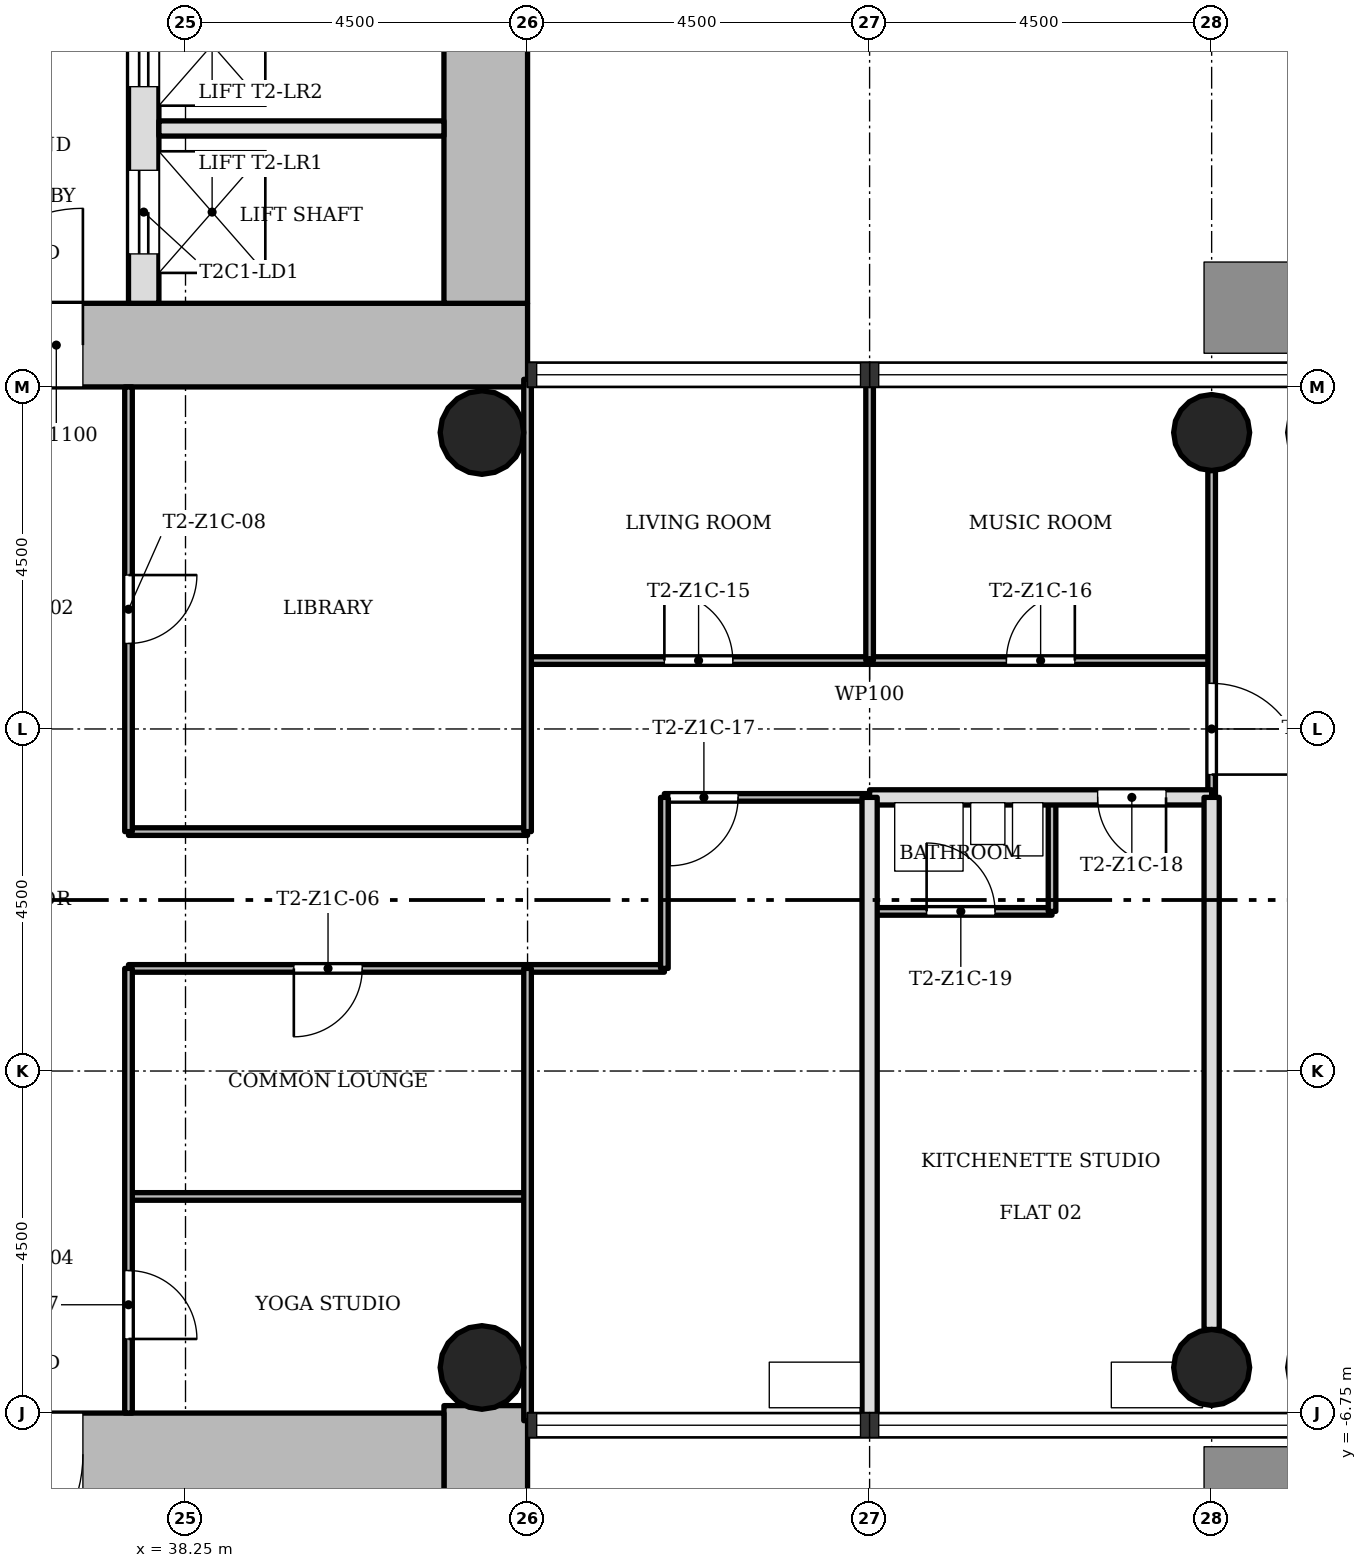
"""IFC4 building model, lengths in metres.
Left out: names, types, materials, properties, quantities, classifications, styles, units other than length and angle.
Written with IfcOpenShell. Run it as: python <this file> out.ifc"""

import sys

from ifc_helpers import new_model, si_unit, direction, frame, frame_2d, origin, origin_2d, place, context, subcontext, project, spatial, rectangle, hollow_circle, extrude, element, fill, save


model = new_model("IFC4")
c1 = context("Model", 3, precision=1e-05, world=origin(), true_north=direction((0.0, 1.0)))
c2 = subcontext(c1, "Body", "Model", "MODEL_VIEW")
j1 = project(units=[si_unit("LENGTHUNIT", "METRE"), si_unit("PLANEANGLEUNIT", "RADIAN")], contexts=[c1])
p1 = place(None, origin())
s1 = spatial("IfcSite", under=j1, at=p1, CompositionType="ELEMENT")
p2 = place(p1, origin())
s2 = spatial("IfcBuilding", under=s1, at=p2, CompositionType="ELEMENT")
p3 = place(p2, frame((0.0, 0.0, 44.9)))
s3 = spatial("IfcBuildingStorey", under=s2, at=p3, CompositionType="ELEMENT", Elevation=44.9)
p4 = place(p3, frame((30.35, 7.3, 0.0), z_axis=(0.0, 0.0, 1.0), x_axis=(1.0, 0.0, 0.0)))
e1 = element("IfcWall", 1, at=p4, inside=s3, PredefinedType="SHEAR", context=c2, shape_type="SweptSolid", body=[
    extrude(rectangle(XDim=12.4, YDim=1.1, at=frame_2d((6.2, 0.0))), origin(), (0.0, 0.0, 1.0), 3.4),
])
p5 = place(p4, frame((4.75, 0.0, 0.0)))
e2 = element("IfcOpeningElement", 2, at=p5, cuts=e1, PredefinedType="OPENING", context=c2, shape_type="SweptSolid", body=[
    extrude(rectangle(XDim=1.8, YDim=2.1, at=frame_2d((0.9, 1.05))), frame((0.0, 0.56, 0.0), z_axis=(0.0, -1.0, 0.0), x_axis=(1.0, 0.0, 0.0)), (0.0, 0.0, 1.0), 1.12),
])
p6 = place(p3, frame((42.2, 7.85, 0.0), z_axis=(0.0, 0.0, 1.0), x_axis=(0.0, 1.0, 0.0)))
e3 = element("IfcWall", 3, at=p6, inside=s3, PredefinedType="SHEAR", context=c2, shape_type="SweptSolid", body=[
    extrude(rectangle(XDim=7.9, YDim=1.1, at=frame_2d((3.95, 0.0))), origin(), (0.0, 0.0, 1.0), 3.4),
])
p7 = place(p3, frame((37.7, 7.85, 0.0), z_axis=(0.0, 0.0, 1.0), x_axis=(0.0, 1.0, 0.0)))
e4 = element("IfcWall", 4, at=p7, inside=s3, PredefinedType="SHEAR", context=c2, shape_type="SweptSolid", body=[
    extrude(rectangle(XDim=6.8, YDim=0.4, at=frame_2d((3.4, 0.0))), origin(), (0.0, 0.0, 1.0), 3.4),
])
p8 = place(p7, frame((0.65, 0.0, 0.0)))
e5 = element("IfcOpeningElement", 5, at=p8, cuts=e4, PredefinedType="OPENING", context=c2, shape_type="SweptSolid", body=[
    extrude(rectangle(XDim=1.1, YDim=2.1, at=frame_2d((0.55, 1.05))), frame((0.0, 0.21, 0.0), z_axis=(0.0, -1.0, 0.0), x_axis=(1.0, 0.0, 0.0)), (0.0, 0.0, 1.0), 0.42),
])
p9 = place(p7, frame((2.85, 0.0, 0.0)))
e6 = element("IfcOpeningElement", 6, at=p9, cuts=e4, PredefinedType="OPENING", context=c2, shape_type="SweptSolid", body=[
    extrude(rectangle(XDim=1.1, YDim=2.1, at=frame_2d((0.55, 1.05))), frame((0.0, 0.21, 0.0), z_axis=(0.0, -1.0, 0.0), x_axis=(1.0, 0.0, 0.0)), (0.0, 0.0, 1.0), 0.42),
])
p10 = place(p7, frame((5.05, 0.0, 0.0)))
e7 = element("IfcOpeningElement", 7, at=p10, cuts=e4, PredefinedType="OPENING", context=c2, shape_type="SweptSolid", body=[
    extrude(rectangle(XDim=1.1, YDim=2.1, at=frame_2d((0.55, 1.05))), frame((0.0, 0.21, 0.0), z_axis=(0.0, -1.0, 0.0), x_axis=(1.0, 0.0, 0.0)), (0.0, 0.0, 1.0), 0.42),
])
p11 = place(p3, frame((42.2, -15.248, 0.0), z_axis=(0.0, 0.0, 1.0), x_axis=(0.0, 1.0, 0.0)))
e8 = element("IfcWall", 8, at=p11, inside=s3, PredefinedType="SHEAR", context=c2, shape_type="SweptSolid", body=[
    extrude(rectangle(XDim=8.596, YDim=1.1, at=frame_2d((4.298, 0.0))), origin(), (0.0, 0.0, 1.0), 3.4),
])
p12 = place(p3, frame((41.65, -7.3, 0.0), z_axis=(0.0, 0.0, 1.0), x_axis=(-1.0, 0.0, 0.0)))
e9 = element("IfcWall", 9, at=p12, inside=s3, PredefinedType="SHEAR", context=c2, shape_type="SweptSolid", body=[
    extrude(rectangle(XDim=12.4, YDim=1.1, at=frame_2d((6.2, 0.0))), origin(), (0.0, 0.0, 1.0), 3.4),
])
p13 = place(p12, frame((4.75, 0.0, 0.0)))
e10 = element("IfcOpeningElement", 10, at=p13, cuts=e9, PredefinedType="OPENING", context=c2, shape_type="SweptSolid", body=[
    extrude(rectangle(XDim=1.8, YDim=2.1, at=frame_2d((0.9, 1.05))), frame((0.0, 0.56, 0.0), z_axis=(0.0, -1.0, 0.0), x_axis=(1.0, 0.0, 0.0)), (0.0, 0.0, 1.0), 1.12),
])
for number, where, z_axis, x_axis in (
    (11, (51.75, -6.15, 0.0), (0.0, 0.0, 1.0), (1.0, 0.0, 0.0)),
    (12, (51.75, 6.15, 0.0), (0.0, 0.0, 1.0), (1.0, 0.0, 0.0)),
):
    element("IfcColumn", number, at=place(p3, frame(where, z_axis=z_axis, x_axis=x_axis)), inside=s3, PredefinedType="COLUMN", context=c2, shape_type="SweptSolid", body=[
        extrude(hollow_circle(Radius=0.5, WallThickness=0.036, at=origin_2d()), origin(), (0.0, 0.0, 1.0), 3.4),
    ])
for number, where, z_axis, x_axis in (
    (13, (42.15, -6.15, 0.0), (0.0, 0.0, 1.0), (1.0, 0.0, 0.0)),
    (14, (42.15, 6.15, 0.0), (0.0, 0.0, 1.0), (1.0, 0.0, 0.0)),
):
    element("IfcColumn", number, at=place(p3, frame(where, z_axis=z_axis, x_axis=x_axis)), inside=s3, PredefinedType="COLUMN", context=c2, shape_type="SweptSolid", body=[
        extrude(hollow_circle(Radius=0.55, WallThickness=0.04, at=origin_2d()), origin(), (0.0, 0.0, 1.0), 3.4),
    ])
p14 = place(p3, frame((41.65, 10.15, 0.0), z_axis=(0.0, 0.0, 1.0), x_axis=(-1.0, 0.0, 0.0)))
e15 = element("IfcWall", 15, at=p14, inside=s3, PredefinedType="SOLIDWALL", context=c2, shape_type="SweptSolid", body=[
    extrude(rectangle(XDim=3.75, YDim=0.2, at=frame_2d((1.875, 0.0))), origin(), (0.0, 0.0, 1.0), 3.0),
])
p15 = place(p3, frame((42.75, -3.9, 0.0), z_axis=(0.0, 0.0, 1.0), x_axis=(-1.0, 0.0, 0.0)))
e16 = element("IfcWall", 16, at=p15, inside=s3, PredefinedType="PARTITIONING", context=c2, shape_type="SweptSolid", body=[
    extrude(rectangle(XDim=5.25, YDim=0.1, at=frame_2d((2.625, 0.0))), origin(), (0.0, 0.0, 1.0), 3.0),
])
p16 = place(p3, frame((44.55, -0.9, 0.0), z_axis=(0.0, 0.0, 1.0), x_axis=(-1.0, 0.0, 0.0)))
e17 = element("IfcWall", 17, at=p16, inside=s3, PredefinedType="PARTITIONING", context=c2, shape_type="SweptSolid", body=[
    extrude(rectangle(XDim=7.05, YDim=0.1, at=frame_2d((3.525, 0.0))), origin(), (0.0, 0.0, 1.0), 3.0),
])
p17 = place(p16, frame((3.975, 0.0, 0.0)))
e18 = element("IfcOpeningElement", 18, at=p17, cuts=e17, PredefinedType="OPENING", context=c2, shape_type="SweptSolid", body=[
    extrude(rectangle(XDim=0.9, YDim=2.1, at=frame_2d((0.45, 1.05))), frame((0.0, 0.06, 0.0), z_axis=(0.0, -1.0, 0.0), x_axis=(1.0, 0.0, 0.0)), (0.0, 0.0, 1.0), 0.12),
])
p18 = place(p3, frame((49.65, -0.15, 0.0), z_axis=(0.0, 0.0, 1.0), x_axis=(-1.0, 0.0, 0.0)))
e19 = element("IfcWall", 19, at=p18, inside=s3, PredefinedType="PARTITIONING", context=c2, shape_type="SweptSolid", body=[
    extrude(rectangle(XDim=2.4, YDim=0.1, at=frame_2d((1.2, 0.0))), origin(), (0.0, 0.0, 1.0), 3.0),
])
p19 = place(p18, frame((0.75, 0.0, 0.0)))
e20 = element("IfcOpeningElement", 20, at=p19, cuts=e19, PredefinedType="OPENING", context=c2, shape_type="SweptSolid", body=[
    extrude(rectangle(XDim=0.9, YDim=2.1, at=frame_2d((0.45, 1.05))), frame((0.0, 0.06, 0.0), z_axis=(0.0, -1.0, 0.0), x_axis=(1.0, 0.0, 0.0)), (0.0, 0.0, 1.0), 0.12),
])
p20 = place(p3, frame((42.75, 0.9, 0.0), z_axis=(0.0, 0.0, 1.0), x_axis=(-1.0, 0.0, 0.0)))
e21 = element("IfcWall", 21, at=p20, inside=s3, PredefinedType="PARTITIONING", context=c2, shape_type="SweptSolid", body=[
    extrude(rectangle(XDim=5.25, YDim=0.1, at=frame_2d((2.625, 0.0))), origin(), (0.0, 0.0, 1.0), 3.0),
])
p21 = place(p3, frame((47.25, 1.35, 0.0), z_axis=(0.0, 0.0, 1.0), x_axis=(-1.0, 0.0, 0.0)))
e22 = element("IfcWall", 22, at=p21, inside=s3, PredefinedType="PARTITIONING", context=c2, shape_type="SweptSolid", body=[
    extrude(rectangle(XDim=2.7, YDim=0.1, at=frame_2d((1.35, 0.0))), origin(), (0.0, 0.0, 1.0), 3.0),
])
p22 = place(p21, frame((1.73, 0.0, 0.0)))
e23 = element("IfcOpeningElement", 23, at=p22, cuts=e22, PredefinedType="OPENING", context=c2, shape_type="SweptSolid", body=[
    extrude(rectangle(XDim=0.9, YDim=2.1, at=frame_2d((0.45, 1.05))), frame((0.0, 0.06, 0.0), z_axis=(0.0, -1.0, 0.0), x_axis=(1.0, 0.0, 0.0)), (0.0, 0.0, 1.0), 0.12),
])
p23 = place(p3, frame((51.75, 1.35, 0.0), z_axis=(0.0, 0.0, 1.0), x_axis=(-1.0, 0.0, 0.0)))
e24 = element("IfcWall", 24, at=p23, inside=s3, PredefinedType="SOLIDWALL", context=c2, shape_type="SweptSolid", body=[
    extrude(rectangle(XDim=4.5, YDim=0.2, at=frame_2d((2.25, 0.0))), origin(), (0.0, 0.0, 1.0), 3.0),
])
p24 = place(p23, frame((0.6, 0.0, 0.0)))
e25 = element("IfcOpeningElement", 25, at=p24, cuts=e24, PredefinedType="OPENING", context=c2, shape_type="SweptSolid", body=[
    extrude(rectangle(XDim=0.9, YDim=2.1, at=frame_2d((0.45, 1.05))), frame((0.0, 0.11, 0.0), z_axis=(0.0, -1.0, 0.0), x_axis=(1.0, 0.0, 0.0)), (0.0, 0.0, 1.0), 0.22),
])
p25 = place(p3, frame((51.75, 3.15, 0.0), z_axis=(0.0, 0.0, 1.0), x_axis=(-1.0, 0.0, 0.0)))
e26 = element("IfcWall", 26, at=p25, inside=s3, PredefinedType="PARTITIONING", context=c2, shape_type="SweptSolid", body=[
    extrude(rectangle(XDim=9.0, YDim=0.1, at=frame_2d((4.5, 0.0))), origin(), (0.0, 0.0, 1.0), 3.0),
])
p26 = place(p25, frame((6.3, 0.0, 0.0)))
e27 = element("IfcOpeningElement", 27, at=p26, cuts=e26, PredefinedType="OPENING", context=c2, shape_type="SweptSolid", body=[
    extrude(rectangle(XDim=0.9, YDim=2.1, at=frame_2d((0.45, 1.05))), frame((0.0, 0.06, 0.0), z_axis=(0.0, -1.0, 0.0), x_axis=(1.0, 0.0, 0.0)), (0.0, 0.0, 1.0), 0.12),
])
p27 = place(p25, frame((1.8, 0.0, 0.0)))
e28 = element("IfcOpeningElement", 28, at=p27, cuts=e26, PredefinedType="OPENING", context=c2, shape_type="SweptSolid", body=[
    extrude(rectangle(XDim=0.9, YDim=2.1, at=frame_2d((0.45, 1.05))), frame((0.0, 0.06, 0.0), z_axis=(0.0, -1.0, 0.0), x_axis=(1.0, 0.0, 0.0)), (0.0, 0.0, 1.0), 0.12),
])
p28 = place(p3, frame((51.75, 1.35, 0.0), z_axis=(0.0, 0.0, 1.0), x_axis=(0.0, 1.0, 0.0)))
e29 = element("IfcWall", 29, at=p28, inside=s3, PredefinedType="PARTITIONING", context=c2, shape_type="SweptSolid", body=[
    extrude(rectangle(XDim=4.3, YDim=0.1, at=frame_2d((2.15, 0.0))), origin(), (0.0, 0.0, 1.0), 3.0),
])
p29 = place(p28, frame((0.3, 0.0, 0.0)))
e30 = element("IfcOpeningElement", 30, at=p29, cuts=e29, PredefinedType="OPENING", context=c2, shape_type="SweptSolid", body=[
    extrude(rectangle(XDim=1.2, YDim=2.1, at=frame_2d((0.6, 1.05))), frame((0.0, 0.06, 0.0), z_axis=(0.0, -1.0, 0.0), x_axis=(1.0, 0.0, 0.0)), (0.0, 0.0, 1.0), 0.12),
])
p30 = place(p3, frame((51.75, -5.65, 0.0), z_axis=(0.0, 0.0, 1.0), x_axis=(0.0, 1.0, 0.0)))
e31 = element("IfcWall", 31, at=p30, inside=s3, PredefinedType="SOLIDWALL", context=c2, shape_type="SweptSolid", body=[
    extrude(rectangle(XDim=7.0, YDim=0.2, at=frame_2d((3.5, 0.0))), origin(), (0.0, 0.0, 1.0), 3.0),
])
p31 = place(p3, frame((49.65, -0.15, 0.0), z_axis=(0.0, 0.0, 1.0), x_axis=(0.0, 1.0, 0.0)))
e32 = element("IfcWall", 32, at=p31, inside=s3, PredefinedType="PARTITIONING", context=c2, shape_type="SweptSolid", body=[
    extrude(rectangle(XDim=1.5, YDim=0.1, at=frame_2d((0.75, 0.0))), origin(), (0.0, 0.0, 1.0), 3.0),
])
p32 = place(p3, frame((47.25, 3.15, 0.0), z_axis=(0.0, 0.0, 1.0), x_axis=(0.0, 1.0, 0.0)))
e33 = element("IfcWall", 33, at=p32, inside=s3, PredefinedType="PARTITIONING", context=c2, shape_type="SweptSolid", body=[
    extrude(rectangle(XDim=3.7, YDim=0.1, at=frame_2d((1.85, 0.0))), origin(), (0.0, 0.0, 1.0), 3.0),
])
p33 = place(p3, frame((47.25, -6.85, 0.0), z_axis=(0.0, 0.0, 1.0), x_axis=(0.0, 1.0, 0.0)))
e34 = element("IfcWall", 34, at=p33, inside=s3, PredefinedType="SOLIDWALL", context=c2, shape_type="SweptSolid", body=[
    extrude(rectangle(XDim=8.2, YDim=0.2, at=frame_2d((4.1, 0.0))), origin(), (0.0, 0.0, 1.0), 3.0),
])
p34 = place(p3, frame((44.55, -0.9, 0.0), z_axis=(0.0, 0.0, 1.0), x_axis=(0.0, 1.0, 0.0)))
e35 = element("IfcWall", 35, at=p34, inside=s3, PredefinedType="PARTITIONING", context=c2, shape_type="SweptSolid", body=[
    extrude(rectangle(XDim=2.25, YDim=0.1, at=frame_2d((1.125, 0.0))), origin(), (0.0, 0.0, 1.0), 3.0),
])
for number, where, z_axis, x_axis in (
    (36, (42.75, -6.85, 0.0), (0.0, 0.0, 1.0), (0.0, 1.0, 0.0)),
    (37, (42.75, 0.9, 0.0), (0.0, 0.0, 1.0), (0.0, 1.0, 0.0)),
):
    element("IfcWall", number, at=place(p3, frame(where, z_axis=z_axis, x_axis=x_axis)), inside=s3, PredefinedType="PARTITIONING", context=c2, shape_type="SweptSolid", body=[
        extrude(rectangle(XDim=5.95, YDim=0.1, at=frame_2d((2.975, 0.0))), origin(), (0.0, 0.0, 1.0), 3.0),
    ])
p35 = place(p3, frame((37.5, -6.75, 0.0), z_axis=(0.0, 0.0, 1.0), x_axis=(0.0, 1.0, 0.0)))
e38 = element("IfcWall", 38, at=p35, inside=s3, PredefinedType="PARTITIONING", context=c2, shape_type="SweptSolid", body=[
    extrude(rectangle(XDim=5.85, YDim=0.1, at=frame_2d((2.925, 0.0))), origin(), (0.0, 0.0, 1.0), 3.0),
])
p36 = place(p35, frame((0.975, 0.0, 0.0)))
e39 = element("IfcOpeningElement", 39, at=p36, cuts=e38, PredefinedType="OPENING", context=c2, shape_type="SweptSolid", body=[
    extrude(rectangle(XDim=0.9, YDim=2.1, at=frame_2d((0.45, 1.05))), frame((0.0, 0.06, 0.0), z_axis=(0.0, -1.0, 0.0), x_axis=(1.0, 0.0, 0.0)), (0.0, 0.0, 1.0), 0.12),
])
p37 = place(p3, frame((37.5, 0.9, 0.0), z_axis=(0.0, 0.0, 1.0), x_axis=(0.0, 1.0, 0.0)))
e40 = element("IfcWall", 40, at=p37, inside=s3, PredefinedType="PARTITIONING", context=c2, shape_type="SweptSolid", body=[
    extrude(rectangle(XDim=5.85, YDim=0.1, at=frame_2d((2.925, 0.0))), origin(), (0.0, 0.0, 1.0), 3.0),
])
p38 = place(p37, frame((2.475, 0.0, 0.0)))
e41 = element("IfcOpeningElement", 41, at=p38, cuts=e40, PredefinedType="OPENING", context=c2, shape_type="SweptSolid", body=[
    extrude(rectangle(XDim=0.9, YDim=2.1, at=frame_2d((0.45, 1.05))), frame((0.0, 0.06, 0.0), z_axis=(0.0, -1.0, 0.0), x_axis=(1.0, 0.0, 0.0)), (0.0, 0.0, 1.0), 0.12),
])
p39 = place(p17, origin())
e42 = element("IfcDoor", 42, at=p39, inside=s3, OperationType="SINGLE_SWING_LEFT", PredefinedType="DOOR", context=c2, shape_type="SweptSolid", body=[
    extrude(rectangle(XDim=0.9, YDim=2.1, at=frame_2d((0.45, 1.05))), frame((0.0, 0.025, 0.0), z_axis=(0.0, -1.0, 0.0), x_axis=(1.0, 0.0, 0.0)), (0.0, 0.0, 1.0), 0.05),
])
fill(e18, e42)
p40 = place(p36, origin())
e43 = element("IfcDoor", 43, at=p40, inside=s3, OperationType="SINGLE_SWING_LEFT", PredefinedType="DOOR", context=c2, shape_type="SweptSolid", body=[
    extrude(rectangle(XDim=0.9, YDim=2.1, at=frame_2d((0.45, 1.05))), frame((0.0, 0.025, 0.0), z_axis=(0.0, -1.0, 0.0), x_axis=(1.0, 0.0, 0.0)), (0.0, 0.0, 1.0), 0.05),
])
fill(e39, e43)
p41 = place(p38, origin())
e44 = element("IfcDoor", 44, at=p41, inside=s3, OperationType="SINGLE_SWING_RIGHT", PredefinedType="DOOR", context=c2, shape_type="SweptSolid", body=[
    extrude(rectangle(XDim=0.9, YDim=2.1, at=frame_2d((0.45, 1.05))), frame((0.0, 0.025, 0.0), z_axis=(0.0, -1.0, 0.0), x_axis=(1.0, 0.0, 0.0)), (0.0, 0.0, 1.0), 0.05),
])
fill(e41, e44)
p42 = place(p26, origin())
e45 = element("IfcDoor", 45, at=p42, inside=s3, OperationType="SINGLE_SWING_RIGHT", PredefinedType="DOOR", context=c2, shape_type="SweptSolid", body=[
    extrude(rectangle(XDim=0.9, YDim=2.1, at=frame_2d((0.45, 1.05))), frame((0.0, 0.025, 0.0), z_axis=(0.0, -1.0, 0.0), x_axis=(1.0, 0.0, 0.0)), (0.0, 0.0, 1.0), 0.05),
])
fill(e27, e45)
p43 = place(p27, origin())
e46 = element("IfcDoor", 46, at=p43, inside=s3, OperationType="SINGLE_SWING_LEFT", PredefinedType="DOOR", context=c2, shape_type="SweptSolid", body=[
    extrude(rectangle(XDim=0.9, YDim=2.1, at=frame_2d((0.45, 1.05))), frame((0.0, 0.025, 0.0), z_axis=(0.0, -1.0, 0.0), x_axis=(1.0, 0.0, 0.0)), (0.0, 0.0, 1.0), 0.05),
])
fill(e28, e46)
p44 = place(p22, origin())
e47 = element("IfcDoor", 47, at=p44, inside=s3, OperationType="SINGLE_SWING_LEFT", PredefinedType="DOOR", context=c2, shape_type="SweptSolid", body=[
    extrude(rectangle(XDim=0.9, YDim=2.1, at=frame_2d((0.45, 1.05))), frame((0.0, 0.025, 0.0), z_axis=(0.0, -1.0, 0.0), x_axis=(1.0, 0.0, 0.0)), (0.0, 0.0, 1.0), 0.05),
])
fill(e23, e47)
p45 = place(p24, origin())
e48 = element("IfcDoor", 48, at=p45, inside=s3, OperationType="SINGLE_SWING_RIGHT", PredefinedType="DOOR", context=c2, shape_type="SweptSolid", body=[
    extrude(rectangle(XDim=0.9, YDim=2.1, at=frame_2d((0.45, 1.05))), frame((0.0, 0.025, 0.0), z_axis=(0.0, -1.0, 0.0), x_axis=(1.0, 0.0, 0.0)), (0.0, 0.0, 1.0), 0.05),
])
fill(e25, e48)
p46 = place(p19, origin())
e49 = element("IfcDoor", 49, at=p46, inside=s3, OperationType="SINGLE_SWING_RIGHT", PredefinedType="DOOR", context=c2, shape_type="SweptSolid", body=[
    extrude(rectangle(XDim=0.9, YDim=2.1, at=frame_2d((0.45, 1.05))), frame((0.0, 0.025, 0.0), z_axis=(0.0, -1.0, 0.0), x_axis=(1.0, 0.0, 0.0)), (0.0, 0.0, 1.0), 0.05),
])
fill(e20, e49)
p47 = place(p29, origin())
e50 = element("IfcDoor", 50, at=p47, inside=s3, OperationType="SINGLE_SWING_LEFT", PredefinedType="DOOR", context=c2, shape_type="SweptSolid", body=[
    extrude(rectangle(XDim=1.2, YDim=2.1, at=frame_2d((0.6, 1.05))), frame((0.0, 0.025, 0.0), z_axis=(0.0, -1.0, 0.0), x_axis=(1.0, 0.0, 0.0)), (0.0, 0.0, 1.0), 0.05),
])
fill(e30, e50)
p48 = place(p8, origin())
e51 = element("IfcDoor", 51, at=p48, inside=s3, OperationType="SLIDING_TO_LEFT", PredefinedType="DOOR", context=c2, shape_type="SweptSolid", body=[
    extrude(rectangle(XDim=1.1, YDim=2.1, at=frame_2d((0.55, 1.05))), frame((0.0, 0.025, 0.0), z_axis=(0.0, -1.0, 0.0), x_axis=(1.0, 0.0, 0.0)), (0.0, 0.0, 1.0), 0.05),
])
fill(e5, e51)
p49 = place(p9, origin())
e52 = element("IfcDoor", 52, at=p49, inside=s3, OperationType="SLIDING_TO_LEFT", PredefinedType="DOOR", context=c2, shape_type="SweptSolid", body=[
    extrude(rectangle(XDim=1.1, YDim=2.1, at=frame_2d((0.55, 1.05))), frame((0.0, 0.025, 0.0), z_axis=(0.0, -1.0, 0.0), x_axis=(1.0, 0.0, 0.0)), (0.0, 0.0, 1.0), 0.05),
])
fill(e6, e52)
p50 = place(p5, origin())
e53 = element("IfcDoor", 53, at=p50, inside=s3, OperationType="SINGLE_SWING_LEFT", PredefinedType="DOOR", context=c2, shape_type="SweptSolid", body=[
    extrude(rectangle(XDim=1.8, YDim=2.1, at=frame_2d((0.9, 1.05))), frame((0.0, 0.025, 0.0), z_axis=(0.0, -1.0, 0.0), x_axis=(1.0, 0.0, 0.0)), (0.0, 0.0, 1.0), 0.05),
])
fill(e2, e53)
p51 = place(p13, origin())
e54 = element("IfcDoor", 54, at=p51, inside=s3, OperationType="SINGLE_SWING_LEFT", PredefinedType="DOOR", context=c2, shape_type="SweptSolid", body=[
    extrude(rectangle(XDim=1.8, YDim=2.1, at=frame_2d((0.9, 1.05))), frame((0.0, 0.025, 0.0), z_axis=(0.0, -1.0, 0.0), x_axis=(1.0, 0.0, 0.0)), (0.0, 0.0, 1.0), 0.05),
])
fill(e10, e54)
save(model, sys.argv[1])
